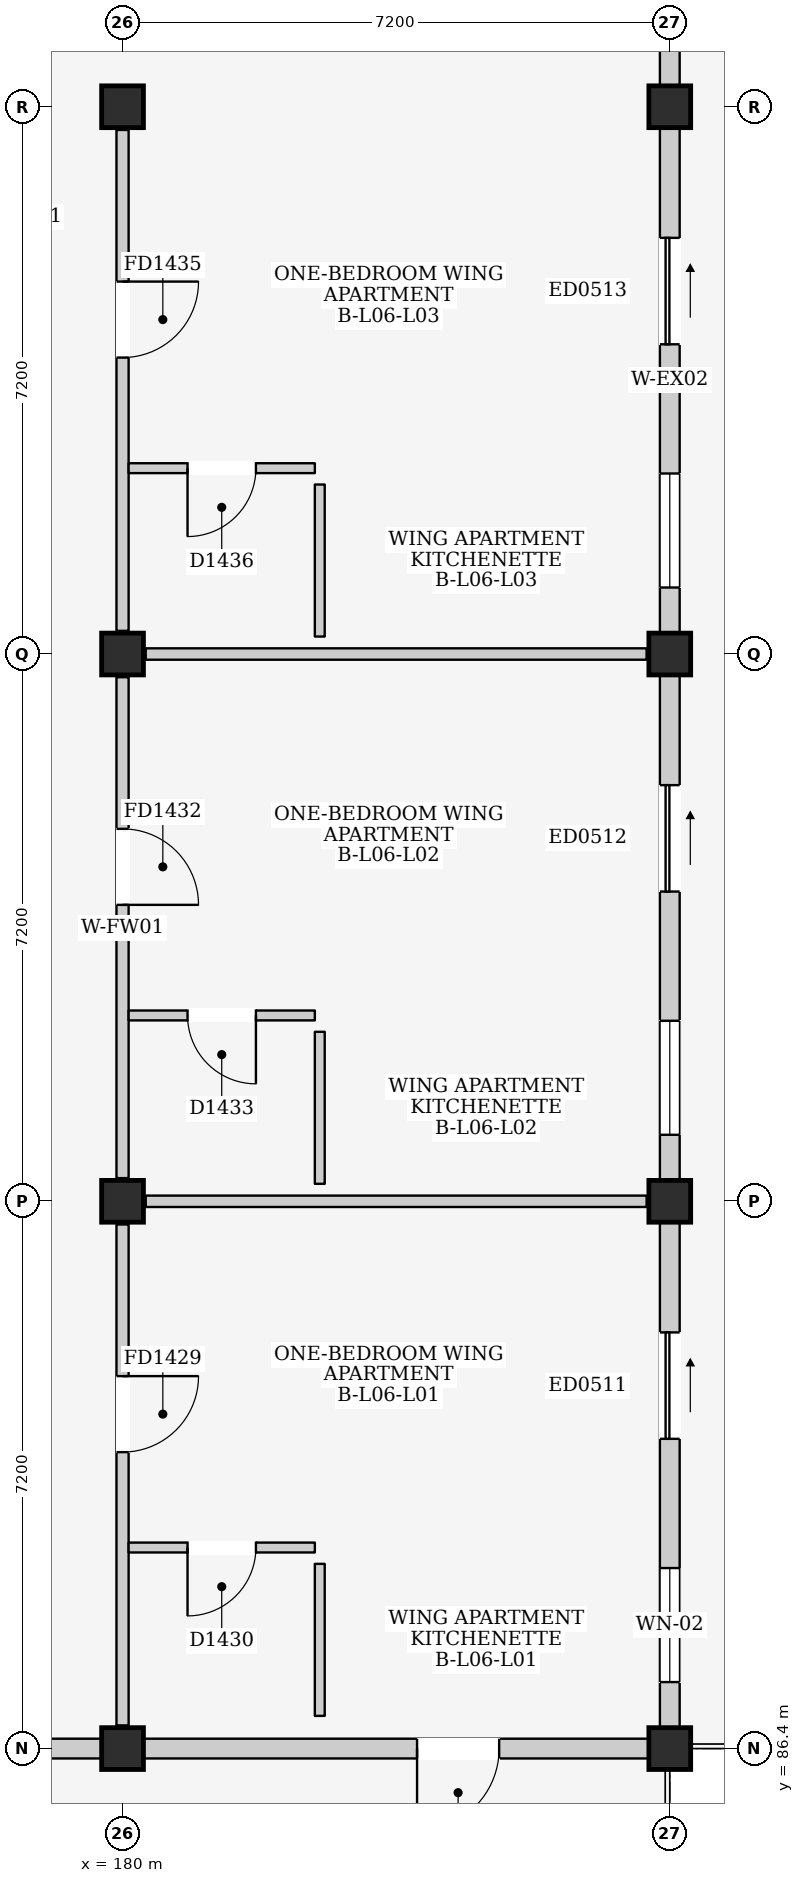
"""IFC4 building model, lengths in metres.
Left out: names, types, materials, properties, quantities, classifications, styles, units other than length and angle.
Written with IfcOpenShell. Run it as: python <this file> out.ifc"""

import sys

from ifc_helpers import new_model, si_unit, direction, frame, frame_2d, origin, origin_2d, place, context, subcontext, project, spatial, rectangle, extrude, element, fill, save


model = new_model("IFC4")
c1 = context("Model", 3, precision=1e-05, world=origin(), true_north=direction((0.0, 1.0)))
c2 = subcontext(c1, "Body", "Model", "MODEL_VIEW")
j1 = project(units=[si_unit("LENGTHUNIT", "METRE"), si_unit("PLANEANGLEUNIT", "RADIAN")], contexts=[c1])
p1 = place(None, origin())
s1 = spatial("IfcSite", under=j1, at=p1, CompositionType="ELEMENT")
p2 = place(p1, origin())
s2 = spatial("IfcBuilding", under=s1, at=p2, CompositionType="ELEMENT")
p3 = place(p2, frame((0.0, 0.0, 21.9)))
s3 = spatial("IfcBuildingStorey", under=s2, at=p3, CompositionType="ELEMENT", Elevation=21.9)
for number, where, z_axis, x_axis in (
    (1, (180.0, 86.4, 0.0), (0.0, 0.0, 1.0), (1.0, 0.0, 0.0)),
    (2, (180.0, 93.6, 0.0), (0.0, 0.0, 1.0), (1.0, 0.0, 0.0)),
    (3, (180.0, 100.8, 0.0), (0.0, 0.0, 1.0), (1.0, 0.0, 0.0)),
    (4, (180.0, 108.0, 0.0), (0.0, 0.0, 1.0), (1.0, 0.0, 0.0)),
    (5, (187.2, 86.4, 0.0), (0.0, 0.0, 1.0), (1.0, 0.0, 0.0)),
    (6, (187.2, 93.6, 0.0), (0.0, 0.0, 1.0), (1.0, 0.0, 0.0)),
    (7, (187.2, 100.8, 0.0), (0.0, 0.0, 1.0), (1.0, 0.0, 0.0)),
    (8, (187.2, 108.0, 0.0), (0.0, 0.0, 1.0), (1.0, 0.0, 0.0)),
):
    element("IfcColumn", number, at=place(p3, frame(where, z_axis=z_axis, x_axis=x_axis)), inside=s3, PredefinedType="COLUMN", context=c2, shape_type="SweptSolid", body=[
        extrude(rectangle(XDim=0.55, YDim=0.55, at=origin_2d()), origin(), (0.0, 0.0, 1.0), 3.2),
    ])
p4 = place(p3, frame((173.075, 86.4, 0.0), z_axis=(0.0, 0.0, 1.0), x_axis=(1.0, 0.0, 0.0)))
e9 = element("IfcWall", 9, at=p4, inside=s3, PredefinedType="ELEMENTEDWALL", context=c2, shape_type="SweptSolid", body=[
    extrude(rectangle(XDim=6.65, YDim=0.26, at=frame_2d((3.325, 0.0))), origin(), (0.0, 0.0, 1.0), 2.365),
])
p5 = place(p4, frame((2.825, 0.0, 1.1)))
e10 = element("IfcOpeningElement", 10, at=p5, cuts=e9, PredefinedType="OPENING", context=c2, shape_type="SweptSolid", body=[
    extrude(rectangle(XDim=1.0, YDim=0.9, at=frame_2d((0.5, 0.45))), frame((0.0, 0.145, 0.0), z_axis=(0.0, -1.0, 0.0), x_axis=(1.0, 0.0, 0.0)), (0.0, 0.0, 1.0), 0.29),
])
p6 = place(p3, frame((180.275, 86.4, 0.0), z_axis=(0.0, 0.0, 1.0), x_axis=(1.0, 0.0, 0.0)))
e11 = element("IfcWall", 11, at=p6, inside=s3, PredefinedType="ELEMENTEDWALL", context=c2, shape_type="SweptSolid", body=[
    extrude(rectangle(XDim=6.65, YDim=0.26, at=frame_2d((3.325, 0.0))), origin(), (0.0, 0.0, 1.0), 2.365),
])
p7 = place(p6, frame((3.6, 0.0, 0.0)))
e12 = element("IfcOpeningElement", 12, at=p7, cuts=e11, PredefinedType="OPENING", context=c2, shape_type="SweptSolid", body=[
    extrude(rectangle(XDim=1.08, YDim=2.12, at=frame_2d((0.54, 1.06))), frame((0.0, 0.145, 0.0), z_axis=(0.0, -1.0, 0.0), x_axis=(1.0, 0.0, 0.0)), (0.0, 0.0, 1.0), 0.29),
])
p8 = place(p3, frame((187.2, 86.675, 0.0), z_axis=(0.0, 0.0, 1.0), x_axis=(0.0, 1.0, 0.0)))
e13 = element("IfcWall", 13, at=p8, inside=s3, PredefinedType="ELEMENTEDWALL", context=c2, shape_type="SweptSolid", body=[
    extrude(rectangle(XDim=6.65, YDim=0.26, at=frame_2d((3.325, 0.0))), origin(), (0.0, 0.0, 1.0), 2.515),
])
p9 = place(p8, frame((3.8, 0.0, 0.0)))
e14 = element("IfcOpeningElement", 14, at=p9, cuts=e13, PredefinedType="OPENING", context=c2, shape_type="SweptSolid", body=[
    extrude(rectangle(XDim=1.4, YDim=2.1, at=frame_2d((0.7, 1.05))), frame((0.0, 0.145, 0.0), z_axis=(0.0, -1.0, 0.0), x_axis=(1.0, 0.0, 0.0)), (0.0, 0.0, 1.0), 0.29),
])
p10 = place(p8, frame((0.6, 0.0, 0.905)))
e15 = element("IfcOpeningElement", 15, at=p10, cuts=e13, PredefinedType="OPENING", context=c2, shape_type="SweptSolid", body=[
    extrude(rectangle(XDim=1.5, YDim=1.5, at=frame_2d((0.75, 0.75))), frame((0.0, 0.145, 0.0), z_axis=(0.0, -1.0, 0.0), x_axis=(1.0, 0.0, 0.0)), (0.0, 0.0, 1.0), 0.29),
])
p11 = place(p3, frame((187.2, 93.875, 0.0), z_axis=(0.0, 0.0, 1.0), x_axis=(0.0, 1.0, 0.0)))
e16 = element("IfcWall", 16, at=p11, inside=s3, PredefinedType="ELEMENTEDWALL", context=c2, shape_type="SweptSolid", body=[
    extrude(rectangle(XDim=6.65, YDim=0.26, at=frame_2d((3.325, 0.0))), origin(), (0.0, 0.0, 1.0), 2.515),
])
p12 = place(p11, frame((3.8, 0.0, 0.0)))
e17 = element("IfcOpeningElement", 17, at=p12, cuts=e16, PredefinedType="OPENING", context=c2, shape_type="SweptSolid", body=[
    extrude(rectangle(XDim=1.4, YDim=2.1, at=frame_2d((0.7, 1.05))), frame((0.0, 0.145, 0.0), z_axis=(0.0, -1.0, 0.0), x_axis=(1.0, 0.0, 0.0)), (0.0, 0.0, 1.0), 0.29),
])
p13 = place(p11, frame((0.6, 0.0, 0.905)))
e18 = element("IfcOpeningElement", 18, at=p13, cuts=e16, PredefinedType="OPENING", context=c2, shape_type="SweptSolid", body=[
    extrude(rectangle(XDim=1.5, YDim=1.5, at=frame_2d((0.75, 0.75))), frame((0.0, 0.145, 0.0), z_axis=(0.0, -1.0, 0.0), x_axis=(1.0, 0.0, 0.0)), (0.0, 0.0, 1.0), 0.29),
])
p14 = place(p3, frame((187.2, 101.075, 0.0), z_axis=(0.0, 0.0, 1.0), x_axis=(0.0, 1.0, 0.0)))
e19 = element("IfcWall", 19, at=p14, inside=s3, PredefinedType="ELEMENTEDWALL", context=c2, shape_type="SweptSolid", body=[
    extrude(rectangle(XDim=6.65, YDim=0.26, at=frame_2d((3.325, 0.0))), origin(), (0.0, 0.0, 1.0), 2.515),
])
p15 = place(p14, frame((3.8, 0.0, 0.0)))
e20 = element("IfcOpeningElement", 20, at=p15, cuts=e19, PredefinedType="OPENING", context=c2, shape_type="SweptSolid", body=[
    extrude(rectangle(XDim=1.4, YDim=2.1, at=frame_2d((0.7, 1.05))), frame((0.0, 0.145, 0.0), z_axis=(0.0, -1.0, 0.0), x_axis=(1.0, 0.0, 0.0)), (0.0, 0.0, 1.0), 0.29),
])
p16 = place(p14, frame((0.6, 0.0, 0.905)))
e21 = element("IfcOpeningElement", 21, at=p16, cuts=e19, PredefinedType="OPENING", context=c2, shape_type="SweptSolid", body=[
    extrude(rectangle(XDim=1.5, YDim=1.5, at=frame_2d((0.75, 0.75))), frame((0.0, 0.145, 0.0), z_axis=(0.0, -1.0, 0.0), x_axis=(1.0, 0.0, 0.0)), (0.0, 0.0, 1.0), 0.29),
])
p17 = place(p3, frame((187.2, 108.275, 0.0), z_axis=(0.0, 0.0, 1.0), x_axis=(0.0, 1.0, 0.0)))
e22 = element("IfcWall", 22, at=p17, inside=s3, PredefinedType="ELEMENTEDWALL", context=c2, shape_type="SweptSolid", body=[
    extrude(rectangle(XDim=6.65, YDim=0.26, at=frame_2d((3.325, 0.0))), origin(), (0.0, 0.0, 1.0), 2.515),
])
p18 = place(p17, frame((3.65, 0.0, 0.0)))
e23 = element("IfcOpeningElement", 23, at=p18, cuts=e22, PredefinedType="OPENING", context=c2, shape_type="SweptSolid", body=[
    extrude(rectangle(XDim=1.4, YDim=2.1, at=frame_2d((0.7, 1.05))), frame((0.0, 0.145, 0.0), z_axis=(0.0, -1.0, 0.0), x_axis=(1.0, 0.0, 0.0)), (0.0, 0.0, 1.0), 0.29),
])
p19 = place(p3, frame((180.0, 86.705, 0.0), z_axis=(0.0, 0.0, 1.0), x_axis=(0.0, 1.0, 0.0)))
e24 = element("IfcWall", 24, at=p19, inside=s3, PredefinedType="PARTITIONING", context=c2, shape_type="SweptSolid", body=[
    extrude(rectangle(XDim=6.59, YDim=0.16, at=frame_2d((3.295, 0.0))), origin(), (0.0, 0.0, 1.0), 2.465),
])
p20 = place(p19, frame((3.595, 0.0, 0.0)))
e25 = element("IfcOpeningElement", 25, at=p20, cuts=e24, PredefinedType="OPENING", context=c2, shape_type="SweptSolid", body=[
    extrude(rectangle(XDim=1.0, YDim=2.15, at=frame_2d((0.5, 1.075))), frame((0.0, 0.095, 0.0), z_axis=(0.0, -1.0, 0.0), x_axis=(1.0, 0.0, 0.0)), (0.0, 0.0, 1.0), 0.19),
])
p21 = place(p3, frame((180.305, 93.6, 0.0), z_axis=(0.0, 0.0, 1.0), x_axis=(1.0, 0.0, 0.0)))
e26 = element("IfcWall", 26, at=p21, inside=s3, PredefinedType="PARTITIONING", context=c2, shape_type="SweptSolid", body=[
    extrude(rectangle(XDim=6.59, YDim=0.15, at=frame_2d((3.295, 0.0))), origin(), (0.0, 0.0, 1.0), 2.365),
])
p22 = place(p3, frame((180.08, 89.045, 0.0), z_axis=(0.0, 0.0, 1.0), x_axis=(1.0, 0.0, 0.0)))
e27 = element("IfcWall", 27, at=p22, inside=s3, PredefinedType="PARTITIONING", context=c2, shape_type="SweptSolid", body=[
    extrude(rectangle(XDim=2.45, YDim=0.13, at=frame_2d((1.225, 0.0))), origin(), (0.0, 0.0, 1.0), 2.98),
])
p23 = place(p22, frame((0.775, 0.0, 0.0)))
e28 = element("IfcOpeningElement", 28, at=p23, cuts=e27, PredefinedType="OPENING", context=c2, shape_type="SweptSolid", body=[
    extrude(rectangle(XDim=0.9, YDim=2.1, at=frame_2d((0.45, 1.05))), frame((0.0, 0.08, 0.0), z_axis=(0.0, -1.0, 0.0), x_axis=(1.0, 0.0, 0.0)), (0.0, 0.0, 1.0), 0.16),
])
p24 = place(p3, frame((182.595, 86.83, 0.0), z_axis=(0.0, 0.0, 1.0), x_axis=(0.0, 1.0, 0.0)))
e29 = element("IfcWall", 29, at=p24, inside=s3, PredefinedType="PARTITIONING", context=c2, shape_type="SweptSolid", body=[
    extrude(rectangle(XDim=2.0, YDim=0.13, at=frame_2d((1.0, 0.0))), origin(), (0.0, 0.0, 1.0), 2.98),
])
p25 = place(p3, frame((180.0, 93.905, 0.0), z_axis=(0.0, 0.0, 1.0), x_axis=(0.0, 1.0, 0.0)))
e30 = element("IfcWall", 30, at=p25, inside=s3, PredefinedType="PARTITIONING", context=c2, shape_type="SweptSolid", body=[
    extrude(rectangle(XDim=6.59, YDim=0.16, at=frame_2d((3.295, 0.0))), origin(), (0.0, 0.0, 1.0), 2.465),
])
p26 = place(p25, frame((3.595, 0.0, 0.0)))
e31 = element("IfcOpeningElement", 31, at=p26, cuts=e30, PredefinedType="OPENING", context=c2, shape_type="SweptSolid", body=[
    extrude(rectangle(XDim=1.0, YDim=2.15, at=frame_2d((0.5, 1.075))), frame((0.0, 0.095, 0.0), z_axis=(0.0, -1.0, 0.0), x_axis=(1.0, 0.0, 0.0)), (0.0, 0.0, 1.0), 0.19),
])
p27 = place(p3, frame((180.305, 100.8, 0.0), z_axis=(0.0, 0.0, 1.0), x_axis=(1.0, 0.0, 0.0)))
e32 = element("IfcWall", 32, at=p27, inside=s3, PredefinedType="PARTITIONING", context=c2, shape_type="SweptSolid", body=[
    extrude(rectangle(XDim=6.59, YDim=0.15, at=frame_2d((3.295, 0.0))), origin(), (0.0, 0.0, 1.0), 2.365),
])
p28 = place(p3, frame((180.08, 96.045, 0.0), z_axis=(0.0, 0.0, 1.0), x_axis=(1.0, 0.0, 0.0)))
e33 = element("IfcWall", 33, at=p28, inside=s3, PredefinedType="PARTITIONING", context=c2, shape_type="SweptSolid", body=[
    extrude(rectangle(XDim=2.45, YDim=0.13, at=frame_2d((1.225, 0.0))), origin(), (0.0, 0.0, 1.0), 2.98),
])
p29 = place(p28, frame((0.775, 0.0, 0.0)))
e34 = element("IfcOpeningElement", 34, at=p29, cuts=e33, PredefinedType="OPENING", context=c2, shape_type="SweptSolid", body=[
    extrude(rectangle(XDim=0.9, YDim=2.1, at=frame_2d((0.45, 1.05))), frame((0.0, 0.08, 0.0), z_axis=(0.0, -1.0, 0.0), x_axis=(1.0, 0.0, 0.0)), (0.0, 0.0, 1.0), 0.16),
])
p30 = place(p3, frame((182.595, 93.83, 0.0), z_axis=(0.0, 0.0, 1.0), x_axis=(0.0, 1.0, 0.0)))
e35 = element("IfcWall", 35, at=p30, inside=s3, PredefinedType="PARTITIONING", context=c2, shape_type="SweptSolid", body=[
    extrude(rectangle(XDim=2.0, YDim=0.13, at=frame_2d((1.0, 0.0))), origin(), (0.0, 0.0, 1.0), 2.98),
])
p31 = place(p3, frame((180.0, 101.105, 0.0), z_axis=(0.0, 0.0, 1.0), x_axis=(0.0, 1.0, 0.0)))
e36 = element("IfcWall", 36, at=p31, inside=s3, PredefinedType="PARTITIONING", context=c2, shape_type="SweptSolid", body=[
    extrude(rectangle(XDim=6.59, YDim=0.16, at=frame_2d((3.295, 0.0))), origin(), (0.0, 0.0, 1.0), 2.465),
])
p32 = place(p31, frame((3.595, 0.0, 0.0)))
e37 = element("IfcOpeningElement", 37, at=p32, cuts=e36, PredefinedType="OPENING", context=c2, shape_type="SweptSolid", body=[
    extrude(rectangle(XDim=1.0, YDim=2.15, at=frame_2d((0.5, 1.075))), frame((0.0, 0.095, 0.0), z_axis=(0.0, -1.0, 0.0), x_axis=(1.0, 0.0, 0.0)), (0.0, 0.0, 1.0), 0.19),
])
p33 = place(p3, frame((180.08, 103.245, 0.0), z_axis=(0.0, 0.0, 1.0), x_axis=(1.0, 0.0, 0.0)))
e38 = element("IfcWall", 38, at=p33, inside=s3, PredefinedType="PARTITIONING", context=c2, shape_type="SweptSolid", body=[
    extrude(rectangle(XDim=2.45, YDim=0.13, at=frame_2d((1.225, 0.0))), origin(), (0.0, 0.0, 1.0), 2.98),
])
p34 = place(p33, frame((0.775, 0.0, 0.0)))
e39 = element("IfcOpeningElement", 39, at=p34, cuts=e38, PredefinedType="OPENING", context=c2, shape_type="SweptSolid", body=[
    extrude(rectangle(XDim=0.9, YDim=2.1, at=frame_2d((0.45, 1.05))), frame((0.0, 0.08, 0.0), z_axis=(0.0, -1.0, 0.0), x_axis=(1.0, 0.0, 0.0)), (0.0, 0.0, 1.0), 0.16),
])
p35 = place(p3, frame((182.595, 101.03, 0.0), z_axis=(0.0, 0.0, 1.0), x_axis=(0.0, 1.0, 0.0)))
e40 = element("IfcWall", 40, at=p35, inside=s3, PredefinedType="PARTITIONING", context=c2, shape_type="SweptSolid", body=[
    extrude(rectangle(XDim=2.0, YDim=0.13, at=frame_2d((1.0, 0.0))), origin(), (0.0, 0.0, 1.0), 2.98),
])
p36 = place(p7, frame((1.08, 0.0, 0.0), z_axis=(0.0, 0.0, 1.0), x_axis=(-1.0, 0.0, 0.0)))
e41 = element("IfcDoor", 41, at=p36, inside=s3, OperationType="SINGLE_SWING_RIGHT", PredefinedType="DOOR", context=c2, shape_type="SweptSolid", body=[
    extrude(rectangle(XDim=1.08, YDim=2.12, at=frame_2d((0.54, 1.06))), frame((0.0, 0.025, 0.0), z_axis=(0.0, -1.0, 0.0), x_axis=(1.0, 0.0, 0.0)), (0.0, 0.0, 1.0), 0.05),
])
fill(e12, e41)
p37 = place(p9, frame((1.4, 0.0, 0.0), z_axis=(0.0, 0.0, 1.0), x_axis=(-1.0, 0.0, 0.0)))
e42 = element("IfcDoor", 42, at=p37, inside=s3, OperationType="SLIDING_TO_RIGHT", PredefinedType="DOOR", context=c2, shape_type="SweptSolid", body=[
    extrude(rectangle(XDim=1.4, YDim=2.1, at=frame_2d((0.7, 1.05))), frame((0.0, 0.025, 0.0), z_axis=(0.0, -1.0, 0.0), x_axis=(1.0, 0.0, 0.0)), (0.0, 0.0, 1.0), 0.05),
])
fill(e14, e42)
p38 = place(p10, origin())
e43 = element("IfcWindow", 43, at=p38, inside=s3, PartitioningType="DOUBLE_PANEL_VERTICAL", PredefinedType="WINDOW", context=c2, shape_type="SweptSolid", body=[
    extrude(rectangle(XDim=1.5, YDim=1.5, at=frame_2d((0.75, 0.75))), frame((0.0, 0.03, 0.0), z_axis=(0.0, -1.0, 0.0), x_axis=(1.0, 0.0, 0.0)), (0.0, 0.0, 1.0), 0.06),
])
fill(e15, e43)
p39 = place(p12, frame((1.4, 0.0, 0.0), z_axis=(0.0, 0.0, 1.0), x_axis=(-1.0, 0.0, 0.0)))
e44 = element("IfcDoor", 44, at=p39, inside=s3, OperationType="SLIDING_TO_RIGHT", PredefinedType="DOOR", context=c2, shape_type="SweptSolid", body=[
    extrude(rectangle(XDim=1.4, YDim=2.1, at=frame_2d((0.7, 1.05))), frame((0.0, 0.025, 0.0), z_axis=(0.0, -1.0, 0.0), x_axis=(1.0, 0.0, 0.0)), (0.0, 0.0, 1.0), 0.05),
])
fill(e17, e44)
p40 = place(p13, origin())
e45 = element("IfcWindow", 45, at=p40, inside=s3, PartitioningType="DOUBLE_PANEL_VERTICAL", PredefinedType="WINDOW", context=c2, shape_type="SweptSolid", body=[
    extrude(rectangle(XDim=1.5, YDim=1.5, at=frame_2d((0.75, 0.75))), frame((0.0, 0.03, 0.0), z_axis=(0.0, -1.0, 0.0), x_axis=(1.0, 0.0, 0.0)), (0.0, 0.0, 1.0), 0.06),
])
fill(e18, e45)
p41 = place(p15, frame((1.4, 0.0, 0.0), z_axis=(0.0, 0.0, 1.0), x_axis=(-1.0, 0.0, 0.0)))
e46 = element("IfcDoor", 46, at=p41, inside=s3, OperationType="SLIDING_TO_RIGHT", PredefinedType="DOOR", context=c2, shape_type="SweptSolid", body=[
    extrude(rectangle(XDim=1.4, YDim=2.1, at=frame_2d((0.7, 1.05))), frame((0.0, 0.025, 0.0), z_axis=(0.0, -1.0, 0.0), x_axis=(1.0, 0.0, 0.0)), (0.0, 0.0, 1.0), 0.05),
])
fill(e20, e46)
p42 = place(p16, origin())
e47 = element("IfcWindow", 47, at=p42, inside=s3, PartitioningType="DOUBLE_PANEL_VERTICAL", PredefinedType="WINDOW", context=c2, shape_type="SweptSolid", body=[
    extrude(rectangle(XDim=1.5, YDim=1.5, at=frame_2d((0.75, 0.75))), frame((0.0, 0.03, 0.0), z_axis=(0.0, -1.0, 0.0), x_axis=(1.0, 0.0, 0.0)), (0.0, 0.0, 1.0), 0.06),
])
fill(e21, e47)
p43 = place(p20, frame((1.0, 0.0, 0.0), z_axis=(0.0, 0.0, 1.0), x_axis=(-1.0, 0.0, 0.0)))
e48 = element("IfcDoor", 48, at=p43, inside=s3, OperationType="SINGLE_SWING_LEFT", PredefinedType="DOOR", context=c2, shape_type="SweptSolid", body=[
    extrude(rectangle(XDim=1.0, YDim=2.15, at=frame_2d((0.5, 1.075))), frame((0.0, 0.025, 0.0), z_axis=(0.0, -1.0, 0.0), x_axis=(1.0, 0.0, 0.0)), (0.0, 0.0, 1.0), 0.05),
])
fill(e25, e48)
p44 = place(p23, frame((0.9, 0.0, 0.0), z_axis=(0.0, 0.0, 1.0), x_axis=(-1.0, 0.0, 0.0)))
e49 = element("IfcDoor", 49, at=p44, inside=s3, OperationType="SINGLE_SWING_RIGHT", PredefinedType="DOOR", context=c2, shape_type="SweptSolid", body=[
    extrude(rectangle(XDim=0.9, YDim=2.1, at=frame_2d((0.45, 1.05))), frame((0.0, 0.025, 0.0), z_axis=(0.0, -1.0, 0.0), x_axis=(1.0, 0.0, 0.0)), (0.0, 0.0, 1.0), 0.05),
])
fill(e28, e49)
p45 = place(p26, frame((1.0, 0.0, 0.0), z_axis=(0.0, 0.0, 1.0), x_axis=(-1.0, 0.0, 0.0)))
e50 = element("IfcDoor", 50, at=p45, inside=s3, OperationType="SINGLE_SWING_RIGHT", PredefinedType="DOOR", context=c2, shape_type="SweptSolid", body=[
    extrude(rectangle(XDim=1.0, YDim=2.15, at=frame_2d((0.5, 1.075))), frame((0.0, 0.025, 0.0), z_axis=(0.0, -1.0, 0.0), x_axis=(1.0, 0.0, 0.0)), (0.0, 0.0, 1.0), 0.05),
])
fill(e31, e50)
p46 = place(p29, frame((0.9, 0.0, 0.0), z_axis=(0.0, 0.0, 1.0), x_axis=(-1.0, 0.0, 0.0)))
e51 = element("IfcDoor", 51, at=p46, inside=s3, OperationType="SINGLE_SWING_LEFT", PredefinedType="DOOR", context=c2, shape_type="SweptSolid", body=[
    extrude(rectangle(XDim=0.9, YDim=2.1, at=frame_2d((0.45, 1.05))), frame((0.0, 0.025, 0.0), z_axis=(0.0, -1.0, 0.0), x_axis=(1.0, 0.0, 0.0)), (0.0, 0.0, 1.0), 0.05),
])
fill(e34, e51)
p47 = place(p32, frame((1.0, 0.0, 0.0), z_axis=(0.0, 0.0, 1.0), x_axis=(-1.0, 0.0, 0.0)))
e52 = element("IfcDoor", 52, at=p47, inside=s3, OperationType="SINGLE_SWING_LEFT", PredefinedType="DOOR", context=c2, shape_type="SweptSolid", body=[
    extrude(rectangle(XDim=1.0, YDim=2.15, at=frame_2d((0.5, 1.075))), frame((0.0, 0.025, 0.0), z_axis=(0.0, -1.0, 0.0), x_axis=(1.0, 0.0, 0.0)), (0.0, 0.0, 1.0), 0.05),
])
fill(e37, e52)
p48 = place(p34, frame((0.9, 0.0, 0.0), z_axis=(0.0, 0.0, 1.0), x_axis=(-1.0, 0.0, 0.0)))
e53 = element("IfcDoor", 53, at=p48, inside=s3, OperationType="SINGLE_SWING_RIGHT", PredefinedType="DOOR", context=c2, shape_type="SweptSolid", body=[
    extrude(rectangle(XDim=0.9, YDim=2.1, at=frame_2d((0.45, 1.05))), frame((0.0, 0.025, 0.0), z_axis=(0.0, -1.0, 0.0), x_axis=(1.0, 0.0, 0.0)), (0.0, 0.0, 1.0), 0.05),
])
fill(e39, e53)
save(model, sys.argv[1])
